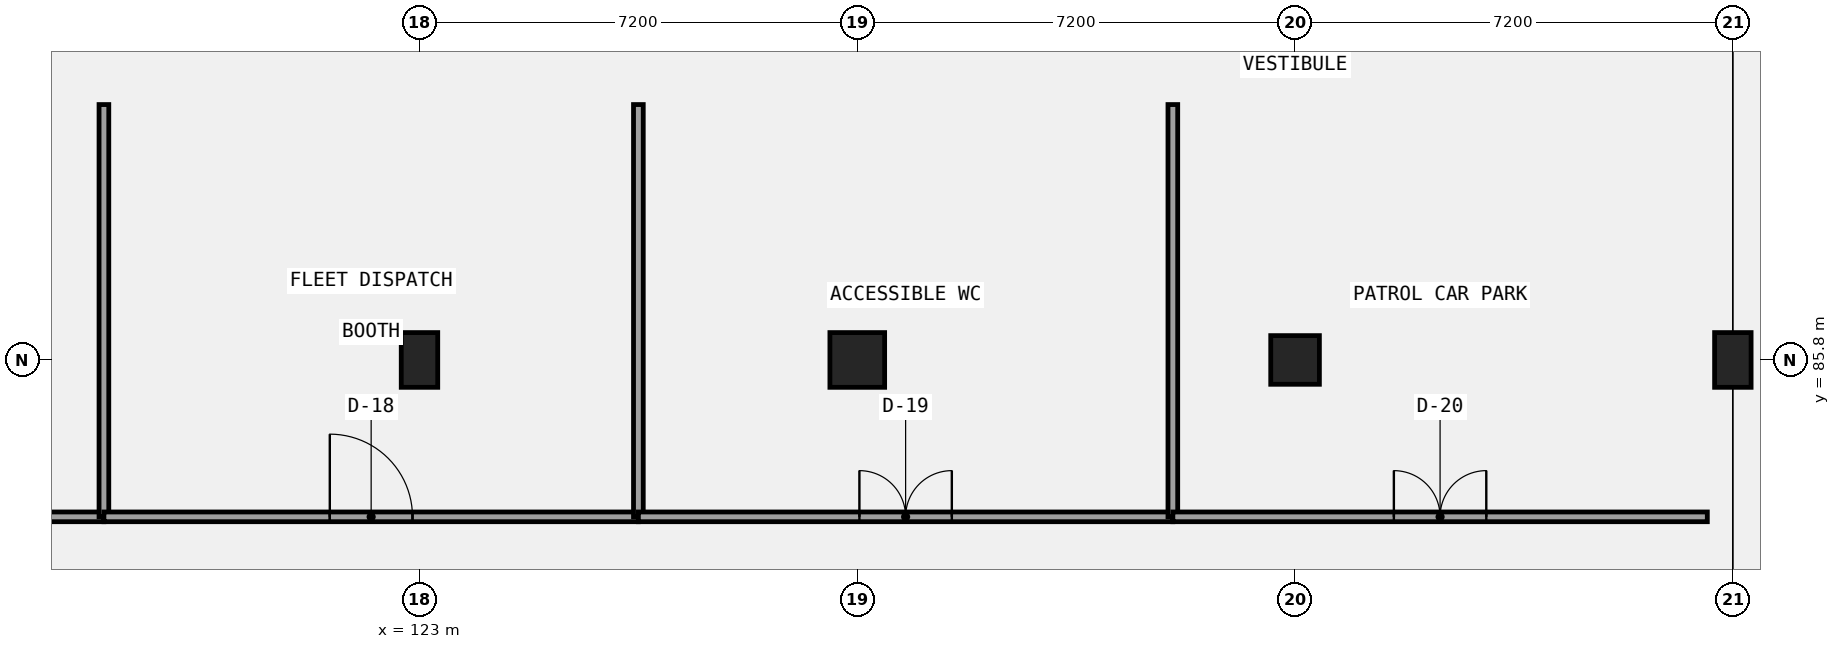
"""IFC4 building model, lengths in metres.
Left out: names, types, materials, properties, quantities, classifications, styles, units other than length and angle.
Written with IfcOpenShell. Run it as: python <this file> out.ifc"""

import sys

from ifc_helpers import new_model, si_unit, direction, frame, frame_2d, origin, origin_2d, place, context, subcontext, project, spatial, rectangle, extrude, element, fill, save


model = new_model("IFC4")
c1 = context("Model", 3, precision=1e-05, world=origin(), true_north=direction((0.0, 1.0)))
c2 = subcontext(c1, "Body", "Model", "MODEL_VIEW")
j1 = project(units=[si_unit("LENGTHUNIT", "METRE"), si_unit("PLANEANGLEUNIT", "RADIAN")], contexts=[c1])
p1 = place(None, origin())
s1 = spatial("IfcSite", under=j1, at=p1, CompositionType="ELEMENT")
p2 = place(p1, origin())
s2 = spatial("IfcBuilding", under=s1, at=p2, CompositionType="ELEMENT")
p3 = place(p2, frame((0.0, 0.0, -4.2)))
s3 = spatial("IfcBuildingStorey", under=s2, at=p3, CompositionType="ELEMENT", Elevation=-4.2)
p4 = place(p3, frame((123.0, 85.8, 0.0), z_axis=(0.0, 0.0, 1.0), x_axis=(1.0, 0.0, 0.0)))
e1 = element("IfcColumn", 1, at=p4, inside=s3, PredefinedType="COLUMN", context=c2, shape_type="SweptSolid", body=[
    extrude(rectangle(XDim=0.6, YDim=0.9, at=origin_2d()), origin(), (0.0, 0.0, 1.0), 4.2),
])
p5 = place(p3, frame((130.2, 85.8, 0.0), z_axis=(0.0, 0.0, 1.0), x_axis=(1.0, 0.0, 0.0)))
e2 = element("IfcColumn", 2, at=p5, inside=s3, PredefinedType="COLUMN", context=c2, shape_type="SweptSolid", body=[
    extrude(rectangle(XDim=0.9, YDim=0.9, at=origin_2d()), origin(), (0.0, 0.0, 1.0), 4.2),
])
p6 = place(p3, frame((137.4, 85.8, 0.0), z_axis=(0.0, 0.0, 1.0), x_axis=(1.0, 0.0, 0.0)))
e3 = element("IfcColumn", 3, at=p6, inside=s3, PredefinedType="COLUMN", context=c2, shape_type="SweptSolid", body=[
    extrude(rectangle(XDim=0.8, YDim=0.8, at=origin_2d()), origin(), (0.0, 0.0, 1.0), 4.2),
])
p7 = place(p3, frame((144.6, 85.8, 0.0), z_axis=(0.0, 0.0, 1.0), x_axis=(1.0, 0.0, 0.0)))
e4 = element("IfcColumn", 4, at=p7, inside=s3, PredefinedType="COLUMN", context=c2, shape_type="SweptSolid", body=[
    extrude(rectangle(XDim=0.6, YDim=0.9, at=origin_2d()), origin(), (0.0, 0.0, 1.0), 4.2),
])
p8 = place(p3, frame((109.02, 83.22, 0.0), z_axis=(0.0, 0.0, 1.0), x_axis=(1.0, 0.0, 0.0)))
e5 = element("IfcWall", 5, at=p8, inside=s3, PredefinedType="PARTITIONING", context=c2, shape_type="SweptSolid", body=[
    extrude(rectangle(XDim=8.79, YDim=0.16, at=frame_2d((4.395, 0.0))), origin(), (0.0, 0.0, 1.0), 3.88),
])
p9 = place(p8, frame((3.715, 0.0, 0.0)))
e6 = element("IfcOpeningElement", 6, at=p9, cuts=e5, PredefinedType="OPENING", context=c2, shape_type="SweptSolid", body=[
    extrude(rectangle(XDim=1.36, YDim=2.22, at=frame_2d((0.68, 1.11))), frame((0.0, 0.09, 0.0), z_axis=(0.0, -1.0, 0.0), x_axis=(1.0, 0.0, 0.0)), (0.0, 0.0, 1.0), 0.18),
])
p10 = place(p3, frame((117.81, 83.22, 0.0), z_axis=(0.0, 0.0, 1.0), x_axis=(0.0, 1.0, 0.0)))
e7 = element("IfcWall", 7, at=p10, inside=s3, PredefinedType="PARTITIONING", context=c2, shape_type="SweptSolid", body=[
    extrude(rectangle(XDim=6.78, YDim=0.16, at=frame_2d((3.39, 0.0))), origin(), (0.0, 0.0, 1.0), 3.88),
])
p11 = place(p3, frame((117.81, 83.22, 0.0), z_axis=(0.0, 0.0, 1.0), x_axis=(1.0, 0.0, 0.0)))
e8 = element("IfcWall", 8, at=p11, inside=s3, PredefinedType="PARTITIONING", context=c2, shape_type="SweptSolid", body=[
    extrude(rectangle(XDim=8.79, YDim=0.16, at=frame_2d((4.395, 0.0))), origin(), (0.0, 0.0, 1.0), 3.88),
])
p12 = place(p11, frame((3.715, 0.0, 0.0)))
e9 = element("IfcOpeningElement", 9, at=p12, cuts=e8, PredefinedType="OPENING", context=c2, shape_type="SweptSolid", body=[
    extrude(rectangle(XDim=1.36, YDim=2.35, at=frame_2d((0.68, 1.175))), frame((0.0, 0.09, 0.0), z_axis=(0.0, -1.0, 0.0), x_axis=(1.0, 0.0, 0.0)), (0.0, 0.0, 1.0), 0.18),
])
p13 = place(p3, frame((126.6, 83.22, 0.0), z_axis=(0.0, 0.0, 1.0), x_axis=(0.0, 1.0, 0.0)))
e10 = element("IfcWall", 10, at=p13, inside=s3, PredefinedType="PARTITIONING", context=c2, shape_type="SweptSolid", body=[
    extrude(rectangle(XDim=6.78, YDim=0.16, at=frame_2d((3.39, 0.0))), origin(), (0.0, 0.0, 1.0), 3.88),
])
p14 = place(p3, frame((126.6, 83.22, 0.0), z_axis=(0.0, 0.0, 1.0), x_axis=(1.0, 0.0, 0.0)))
e11 = element("IfcWall", 11, at=p14, inside=s3, PredefinedType="PARTITIONING", context=c2, shape_type="SweptSolid", body=[
    extrude(rectangle(XDim=8.79, YDim=0.16, at=frame_2d((4.395, 0.0))), origin(), (0.0, 0.0, 1.0), 3.88),
])
p15 = place(p14, frame((3.635, 0.0, 0.0)))
e12 = element("IfcOpeningElement", 12, at=p15, cuts=e11, PredefinedType="OPENING", context=c2, shape_type="SweptSolid", body=[
    extrude(rectangle(XDim=1.52, YDim=2.1, at=frame_2d((0.76, 1.05))), frame((0.0, 0.09, 0.0), z_axis=(0.0, -1.0, 0.0), x_axis=(1.0, 0.0, 0.0)), (0.0, 0.0, 1.0), 0.18),
])
p16 = place(p3, frame((135.39, 83.22, 0.0), z_axis=(0.0, 0.0, 1.0), x_axis=(0.0, 1.0, 0.0)))
e13 = element("IfcWall", 13, at=p16, inside=s3, PredefinedType="PARTITIONING", context=c2, shape_type="SweptSolid", body=[
    extrude(rectangle(XDim=6.78, YDim=0.16, at=frame_2d((3.39, 0.0))), origin(), (0.0, 0.0, 1.0), 3.88),
])
p17 = place(p3, frame((135.39, 83.22, 0.0), z_axis=(0.0, 0.0, 1.0), x_axis=(1.0, 0.0, 0.0)))
e14 = element("IfcWall", 14, at=p17, inside=s3, PredefinedType="PARTITIONING", context=c2, shape_type="SweptSolid", body=[
    extrude(rectangle(XDim=8.79, YDim=0.16, at=frame_2d((4.395, 0.0))), origin(), (0.0, 0.0, 1.0), 3.88),
])
p18 = place(p17, frame((3.635, 0.0, 0.0)))
e15 = element("IfcOpeningElement", 15, at=p18, cuts=e14, PredefinedType="OPENING", context=c2, shape_type="SweptSolid", body=[
    extrude(rectangle(XDim=1.52, YDim=2.22, at=frame_2d((0.76, 1.11))), frame((0.0, 0.09, 0.0), z_axis=(0.0, -1.0, 0.0), x_axis=(1.0, 0.0, 0.0)), (0.0, 0.0, 1.0), 0.18),
])
p19 = place(p12, origin())
e16 = element("IfcDoor", 16, at=p19, inside=s3, OperationType="SINGLE_SWING_LEFT", PredefinedType="DOOR", context=c2, shape_type="SweptSolid", body=[
    extrude(rectangle(XDim=1.36, YDim=2.35, at=frame_2d((0.68, 1.175))), frame((0.0, 0.025, 0.0), z_axis=(0.0, -1.0, 0.0), x_axis=(1.0, 0.0, 0.0)), (0.0, 0.0, 1.0), 0.05),
])
fill(e9, e16)
p20 = place(p15, origin())
e17 = element("IfcDoor", 17, at=p20, inside=s3, OperationType="DOUBLE_DOOR_SINGLE_SWING", PredefinedType="DOOR", context=c2, shape_type="SweptSolid", body=[
    extrude(rectangle(XDim=1.52, YDim=2.1, at=frame_2d((0.76, 1.05))), frame((0.0, 0.025, 0.0), z_axis=(0.0, -1.0, 0.0), x_axis=(1.0, 0.0, 0.0)), (0.0, 0.0, 1.0), 0.05),
])
fill(e12, e17)
p21 = place(p18, origin())
e18 = element("IfcDoor", 18, at=p21, inside=s3, OperationType="DOUBLE_DOOR_SINGLE_SWING", PredefinedType="DOOR", context=c2, shape_type="SweptSolid", body=[
    extrude(rectangle(XDim=1.52, YDim=2.22, at=frame_2d((0.76, 1.11))), frame((0.0, 0.025, 0.0), z_axis=(0.0, -1.0, 0.0), x_axis=(1.0, 0.0, 0.0)), (0.0, 0.0, 1.0), 0.05),
])
fill(e15, e18)
save(model, sys.argv[1])
